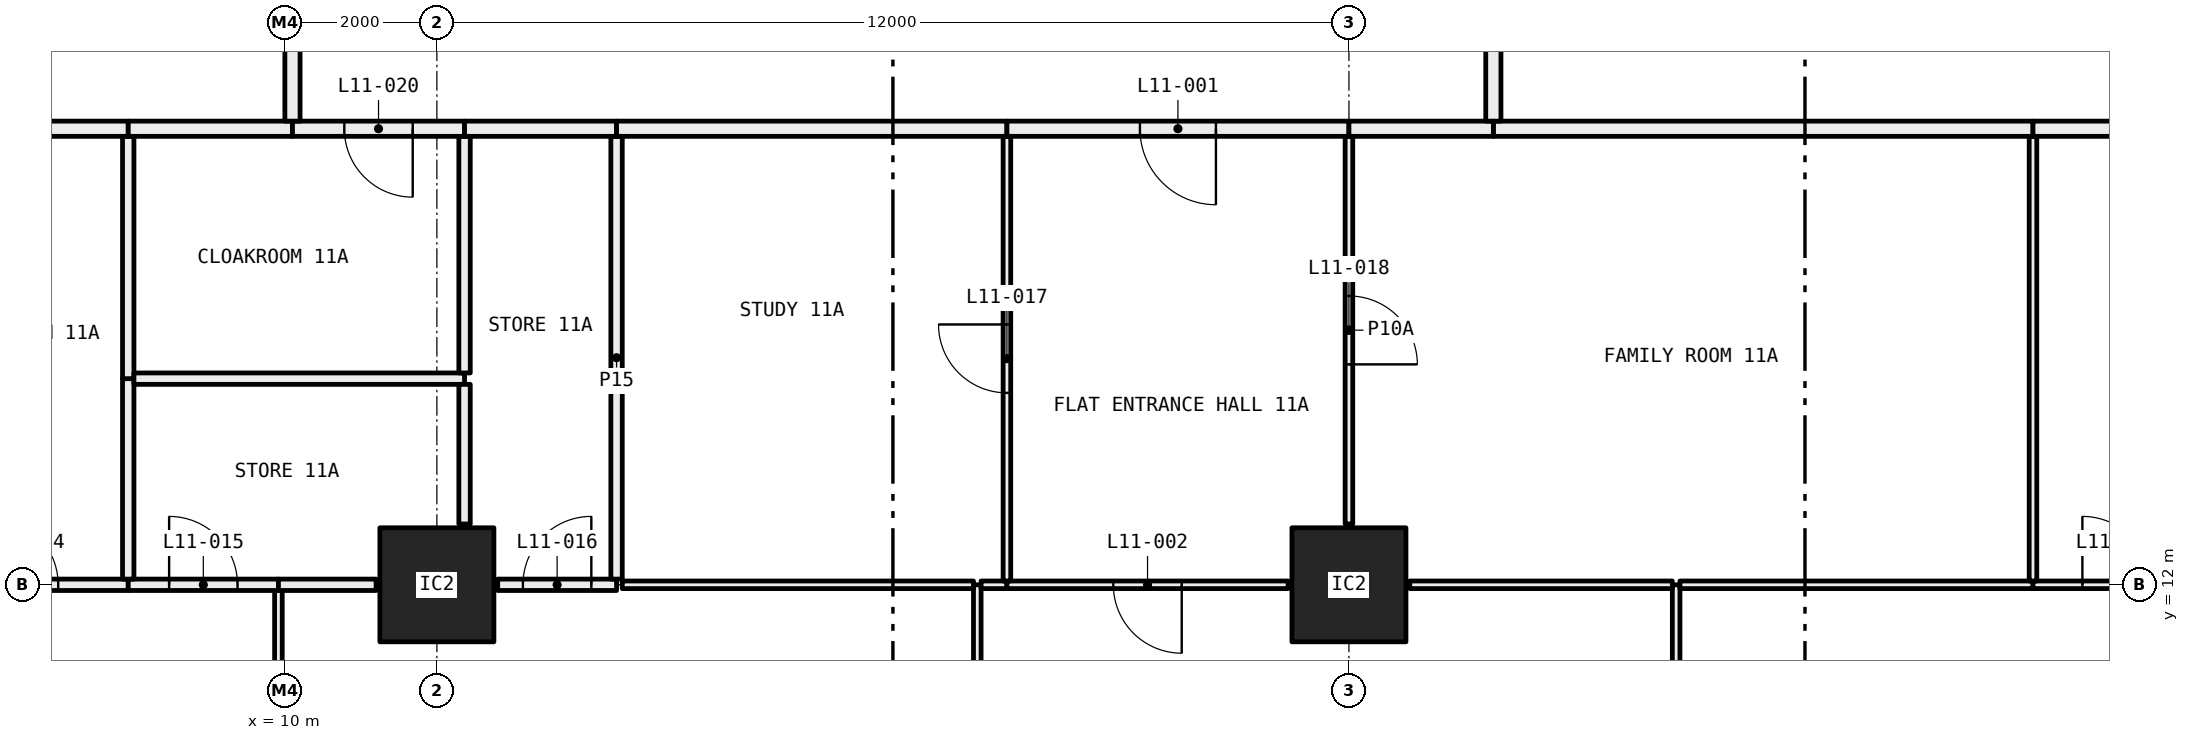
"""IFC4 building model, lengths in metres.
Left out: names, types, materials, properties, quantities, classifications, styles, units other than length and angle.
Written with IfcOpenShell. Run it as: python <this file> out.ifc"""

import sys

from ifc_helpers import new_model, si_unit, direction, frame, frame_2d, origin, origin_2d, place, context, subcontext, project, spatial, rectangle, hollow_rectangle, extrude, element, fill, save


model = new_model("IFC4")
c1 = context("Model", 3, precision=1e-05, world=origin(), true_north=direction((0.0, 1.0)))
c2 = subcontext(c1, "Body", "Model", "MODEL_VIEW")
j1 = project(units=[si_unit("LENGTHUNIT", "METRE"), si_unit("PLANEANGLEUNIT", "RADIAN")], contexts=[c1])
p1 = place(None, origin())
s1 = spatial("IfcSite", under=j1, at=p1, CompositionType="ELEMENT")
p2 = place(p1, origin())
s2 = spatial("IfcBuilding", under=s1, at=p2, CompositionType="ELEMENT")
p3 = place(p2, frame((0.0, 0.0, 50.7)))
s3 = spatial("IfcBuildingStorey", under=s2, at=p3, CompositionType="ELEMENT", Elevation=50.7)
for number, where, z_axis, x_axis in (
    (1, (12.0, 12.0, 0.0), (0.0, 0.0, 1.0), (1.0, 0.0, 0.0)),
    (2, (24.0, 12.0, 0.0), (0.0, 0.0, 1.0), (1.0, 0.0, 0.0)),
):
    element("IfcColumn", number, at=place(p3, frame(where, z_axis=z_axis, x_axis=x_axis)), inside=s3, PredefinedType="COLUMN", context=c2, shape_type="SweptSolid", body=[
        extrude(hollow_rectangle(XDim=1.5, YDim=1.5, WallThickness=0.065, at=origin_2d()), origin(), (0.0, 0.0, 1.0), 3.05),
    ])
p4 = place(p3, frame((9.915, 6.05, 0.0), z_axis=(0.0, 0.0, 1.0), x_axis=(0.0, 1.0, 0.0)))
e3 = element("IfcWall", 3, at=p4, inside=s3, PredefinedType="PARTITIONING", context=c2, shape_type="SweptSolid", body=[
    extrude(rectangle(XDim=5.875, YDim=0.1, at=frame_2d((2.938, 0.0))), origin(), (0.0, 0.0, 1.0), 2.45),
])
p5 = place(p4, frame((2.488, 0.0, 0.0)))
e4 = element("IfcOpeningElement", 4, at=p5, cuts=e3, PredefinedType="OPENING", context=c2, shape_type="SweptSolid", body=[
    extrude(rectangle(XDim=0.9, YDim=2.1, at=frame_2d((0.45, 1.05))), frame((0.0, 0.06, 0.0), z_axis=(0.0, -1.0, 0.0), x_axis=(1.0, 0.0, 0.0)), (0.0, 0.0, 1.0), 0.12),
])
p6 = place(p3, frame((7.939, 12.0, 0.0), z_axis=(0.0, 0.0, 1.0), x_axis=(-1.0, 0.0, 0.0)))
e5 = element("IfcWall", 5, at=p6, inside=s3, PredefinedType="PARTITIONING", context=c2, shape_type="SweptSolid", body=[
    extrude(rectangle(XDim=2.743, YDim=0.15, at=frame_2d((1.372, 0.0))), origin(), (0.0, 0.0, 1.0), 2.45),
])
p7 = place(p6, frame((0.921, 0.0, 0.0)))
e6 = element("IfcOpeningElement", 6, at=p7, cuts=e5, PredefinedType="OPENING", context=c2, shape_type="SweptSolid", body=[
    extrude(rectangle(XDim=0.9, YDim=2.1, at=frame_2d((0.45, 1.05))), frame((0.0, 0.085, 0.0), z_axis=(0.0, -1.0, 0.0), x_axis=(1.0, 0.0, 0.0)), (0.0, 0.0, 1.0), 0.17),
])
p8 = place(p3, frame((9.915, 12.0, 0.0), z_axis=(0.0, 0.0, 1.0), x_axis=(-1.0, 0.0, 0.0)))
e7 = element("IfcWall", 7, at=p8, inside=s3, PredefinedType="PARTITIONING", context=c2, shape_type="SweptSolid", body=[
    extrude(rectangle(XDim=1.976, YDim=0.15, at=frame_2d((0.988, 0.0))), origin(), (0.0, 0.0, 1.0), 2.45),
])
p9 = place(p8, frame((0.538, 0.0, 0.0)))
e8 = element("IfcOpeningElement", 8, at=p9, cuts=e7, PredefinedType="OPENING", context=c2, shape_type="SweptSolid", body=[
    extrude(rectangle(XDim=0.9, YDim=2.1, at=frame_2d((0.45, 1.05))), frame((0.0, 0.085, 0.0), z_axis=(0.0, -1.0, 0.0), x_axis=(1.0, 0.0, 0.0)), (0.0, 0.0, 1.0), 0.17),
])
p10 = place(p3, frame((19.11, 6.05, 0.0), z_axis=(0.0, 0.0, 1.0), x_axis=(0.0, 1.0, 0.0)))
e9 = element("IfcWall", 9, at=p10, inside=s3, PredefinedType="PARTITIONING", context=c2, shape_type="SweptSolid", body=[
    extrude(rectangle(XDim=5.95, YDim=0.1, at=frame_2d((2.975, 0.0))), origin(), (0.0, 0.0, 1.0), 2.45),
])
p11 = place(p10, frame((2.525, 0.0, 0.0)))
e10 = element("IfcOpeningElement", 10, at=p11, cuts=e9, PredefinedType="OPENING", context=c2, shape_type="SweptSolid", body=[
    extrude(rectangle(XDim=0.9, YDim=2.1, at=frame_2d((0.45, 1.05))), frame((0.0, 0.06, 0.0), z_axis=(0.0, -1.0, 0.0), x_axis=(1.0, 0.0, 0.0)), (0.0, 0.0, 1.0), 0.12),
])
p12 = place(p3, frame((11.2, 12.0, 0.0), z_axis=(0.0, 0.0, 1.0), x_axis=(-1.0, 0.0, 0.0)))
e11 = element("IfcWall", 11, at=p12, inside=s3, PredefinedType="PARTITIONING", context=c2, shape_type="SweptSolid", body=[
    extrude(rectangle(XDim=1.285, YDim=0.15, at=frame_2d((0.643, 0.0))), origin(), (0.0, 0.0, 1.0), 2.45),
])
p13 = place(p3, frame((14.364, 12.0, 0.0), z_axis=(0.0, 0.0, 1.0), x_axis=(-1.0, 0.0, 0.0)))
e12 = element("IfcWall", 12, at=p13, inside=s3, PredefinedType="PARTITIONING", context=c2, shape_type="SweptSolid", body=[
    extrude(rectangle(XDim=1.564, YDim=0.15, at=frame_2d((0.782, 0.0))), origin(), (0.0, 0.0, 1.0), 2.45),
])
p14 = place(p13, frame((0.332, 0.0, 0.0)))
e13 = element("IfcOpeningElement", 13, at=p14, cuts=e12, PredefinedType="OPENING", context=c2, shape_type="SweptSolid", body=[
    extrude(rectangle(XDim=0.9, YDim=2.1, at=frame_2d((0.45, 1.05))), frame((0.0, 0.085, 0.0), z_axis=(0.0, -1.0, 0.0), x_axis=(1.0, 0.0, 0.0)), (0.0, 0.0, 1.0), 0.17),
])
p15 = place(p3, frame((19.06, 12.0, 0.0), z_axis=(0.0, 0.0, 1.0), x_axis=(-1.0, 0.0, 0.0)))
e14 = element("IfcWall", 14, at=p15, inside=s3, PredefinedType="PARTITIONING", context=c2, shape_type="SweptSolid", body=[
    extrude(rectangle(XDim=4.621, YDim=0.1, at=frame_2d((2.311, 0.0))), origin(), (0.0, 0.0, 1.0), 2.45),
])
p16 = place(p3, frame((28.305, 6.05, 0.0), z_axis=(0.0, 0.0, 1.0), x_axis=(0.0, 1.0, 0.0)))
e15 = element("IfcWall", 15, at=p16, inside=s3, PredefinedType="PARTITIONING", context=c2, shape_type="SweptSolid", body=[
    extrude(rectangle(XDim=5.95, YDim=0.1, at=frame_2d((2.975, 0.0))), origin(), (0.0, 0.0, 1.0), 2.45),
])
p17 = place(p16, frame((2.525, 0.0, 0.0)))
e16 = element("IfcOpeningElement", 16, at=p17, cuts=e15, PredefinedType="OPENING", context=c2, shape_type="SweptSolid", body=[
    extrude(rectangle(XDim=0.9, YDim=2.1, at=frame_2d((0.45, 1.05))), frame((0.0, 0.06, 0.0), z_axis=(0.0, -1.0, 0.0), x_axis=(1.0, 0.0, 0.0)), (0.0, 0.0, 1.0), 0.12),
])
p18 = place(p3, frame((19.5, 12.0, 0.0), z_axis=(0.0, 0.0, 1.0), x_axis=(-1.0, 0.0, 0.0)))
e17 = element("IfcWall", 17, at=p18, inside=s3, PredefinedType="PARTITIONING", context=c2, shape_type="SweptSolid", body=[
    extrude(rectangle(XDim=0.34, YDim=0.1, at=frame_2d((0.17, 0.0))), origin(), (0.0, 0.0, 1.0), 2.45),
])
p19 = place(p3, frame((23.2, 12.0, 0.0), z_axis=(0.0, 0.0, 1.0), x_axis=(-1.0, 0.0, 0.0)))
e18 = element("IfcWall", 18, at=p19, inside=s3, PredefinedType="PARTITIONING", context=c2, shape_type="SweptSolid", body=[
    extrude(rectangle(XDim=3.7, YDim=0.1, at=frame_2d((1.85, 0.0))), origin(), (0.0, 0.0, 1.0), 2.45),
])
p20 = place(p19, frame((1.4, 0.0, 0.0)))
e19 = element("IfcOpeningElement", 19, at=p20, cuts=e18, PredefinedType="OPENING", context=c2, shape_type="SweptSolid", body=[
    extrude(rectangle(XDim=0.9, YDim=2.1, at=frame_2d((0.45, 1.05))), frame((0.0, 0.06, 0.0), z_axis=(0.0, -1.0, 0.0), x_axis=(1.0, 0.0, 0.0)), (0.0, 0.0, 1.0), 0.12),
])
p21 = place(p3, frame((28.255, 12.0, 0.0), z_axis=(0.0, 0.0, 1.0), x_axis=(-1.0, 0.0, 0.0)))
e20 = element("IfcWall", 20, at=p21, inside=s3, PredefinedType="PARTITIONING", context=c2, shape_type="SweptSolid", body=[
    extrude(rectangle(XDim=3.455, YDim=0.1, at=frame_2d((1.728, 0.0))), origin(), (0.0, 0.0, 1.0), 2.45),
])
p22 = place(p3, frame((33.0, 12.0, 0.0), z_axis=(0.0, 0.0, 1.0), x_axis=(-1.0, 0.0, 0.0)))
e21 = element("IfcWall", 21, at=p22, inside=s3, PredefinedType="PARTITIONING", context=c2, shape_type="SweptSolid", body=[
    extrude(rectangle(XDim=4.645, YDim=0.1, at=frame_2d((2.323, 0.0))), origin(), (0.0, 0.0, 1.0), 2.45),
])
p23 = place(p3, frame((35.2, 12.0, 0.0), z_axis=(0.0, 0.0, 1.0), x_axis=(-1.0, 0.0, 0.0)))
e22 = element("IfcWall", 22, at=p23, inside=s3, PredefinedType="PARTITIONING", context=c2, shape_type="SweptSolid", body=[
    extrude(rectangle(XDim=2.2, YDim=0.1, at=frame_2d((1.1, 0.0))), origin(), (0.0, 0.0, 1.0), 2.45),
])
p24 = place(p23, frame((0.65, 0.0, 0.0)))
e23 = element("IfcOpeningElement", 23, at=p24, cuts=e22, PredefinedType="OPENING", context=c2, shape_type="SweptSolid", body=[
    extrude(rectangle(XDim=0.9, YDim=2.1, at=frame_2d((0.45, 1.05))), frame((0.0, 0.06, 0.0), z_axis=(0.0, -1.0, 0.0), x_axis=(1.0, 0.0, 0.0)), (0.0, 0.0, 1.0), 0.12),
])
p25 = place(p3, frame((7.939, 12.075, 0.0), z_axis=(0.0, 0.0, 1.0), x_axis=(0.0, 1.0, 0.0)))
e24 = element("IfcWall", 24, at=p25, inside=s3, PredefinedType="PARTITIONING", context=c2, shape_type="SweptSolid", body=[
    extrude(rectangle(XDim=2.637, YDim=0.15, at=frame_2d((1.318, 0.0))), origin(), (0.0, 0.0, 1.0), 2.45),
])
p26 = place(p3, frame((7.939, 14.712, 0.0), z_axis=(0.0, 0.0, 1.0), x_axis=(0.0, 1.0, 0.0)))
e25 = element("IfcWall", 25, at=p26, inside=s3, PredefinedType="PARTITIONING", context=c2, shape_type="SweptSolid", body=[
    extrude(rectangle(XDim=3.188, YDim=0.15, at=frame_2d((1.594, 0.0))), origin(), (0.0, 0.0, 1.0), 3.05),
])
p27 = place(p3, frame((7.939, 18.0, 0.0), z_axis=(0.0, 0.0, 1.0), x_axis=(-1.0, 0.0, 0.0)))
e26 = element("IfcWall", 26, at=p27, inside=s3, PredefinedType="PARTITIONING", context=c2, shape_type="SweptSolid", body=[
    extrude(rectangle(XDim=1.939, YDim=0.2, at=frame_2d((0.969, 0.0))), origin(), (0.0, 0.0, 1.0), 3.05),
])
p28 = place(p3, frame((12.364, 14.712, 0.0), z_axis=(0.0, 0.0, 1.0), x_axis=(-1.0, 0.0, 0.0)))
e27 = element("IfcWall", 27, at=p28, inside=s3, PredefinedType="PARTITIONING", context=c2, shape_type="SweptSolid", body=[
    extrude(rectangle(XDim=4.35, YDim=0.15, at=frame_2d((2.175, 0.0))), origin(), (0.0, 0.0, 1.0), 3.05),
])
p29 = place(p3, frame((12.364, 12.8, 0.0), z_axis=(0.0, 0.0, 1.0), x_axis=(0.0, 1.0, 0.0)))
e28 = element("IfcWall", 28, at=p29, inside=s3, PredefinedType="PARTITIONING", context=c2, shape_type="SweptSolid", body=[
    extrude(rectangle(XDim=1.837, YDim=0.15, at=frame_2d((0.918, 0.0))), origin(), (0.0, 0.0, 1.0), 3.05),
])
p30 = place(p3, frame((12.364, 14.787, 0.0), z_axis=(0.0, 0.0, 1.0), x_axis=(0.0, 1.0, 0.0)))
e29 = element("IfcWall", 29, at=p30, inside=s3, PredefinedType="PARTITIONING", context=c2, shape_type="SweptSolid", body=[
    extrude(rectangle(XDim=3.113, YDim=0.15, at=frame_2d((1.556, 0.0))), origin(), (0.0, 0.0, 1.0), 3.05),
])
p31 = place(p3, frame((10.1, 18.0, 0.0), z_axis=(0.0, 0.0, 1.0), x_axis=(-1.0, 0.0, 0.0)))
e30 = element("IfcWall", 30, at=p31, inside=s3, PredefinedType="PARTITIONING", context=c2, shape_type="SweptSolid", body=[
    extrude(rectangle(XDim=2.161, YDim=0.2, at=frame_2d((1.081, 0.0))), origin(), (0.0, 0.0, 1.0), 3.05),
])
p32 = place(p3, frame((12.364, 18.0, 0.0), z_axis=(0.0, 0.0, 1.0), x_axis=(-1.0, 0.0, 0.0)))
e31 = element("IfcWall", 31, at=p32, inside=s3, PredefinedType="PARTITIONING", context=c2, shape_type="SweptSolid", body=[
    extrude(rectangle(XDim=2.264, YDim=0.2, at=frame_2d((1.132, 0.0))), origin(), (0.0, 0.0, 1.0), 3.05),
])
p33 = place(p32, frame((0.682, 0.0, 0.0)))
e32 = element("IfcOpeningElement", 32, at=p33, cuts=e31, PredefinedType="OPENING", context=c2, shape_type="SweptSolid", body=[
    extrude(rectangle(XDim=0.9, YDim=2.1, at=frame_2d((0.45, 1.05))), frame((0.0, 0.11, 0.0), z_axis=(0.0, -1.0, 0.0), x_axis=(1.0, 0.0, 0.0)), (0.0, 0.0, 1.0), 0.22),
])
p34 = place(p3, frame((14.364, 12.075, 0.0), z_axis=(0.0, 0.0, 1.0), x_axis=(0.0, 1.0, 0.0)))
e33 = element("IfcWall", 33, at=p34, inside=s3, PredefinedType="PARTITIONING", context=c2, shape_type="SweptSolid", body=[
    extrude(rectangle(XDim=5.825, YDim=0.15, at=frame_2d((2.913, 0.0))), origin(), (0.0, 0.0, 1.0), 2.45),
])
p35 = place(p3, frame((14.364, 18.0, 0.0), z_axis=(0.0, 0.0, 1.0), x_axis=(-1.0, 0.0, 0.0)))
e34 = element("IfcWall", 34, at=p35, inside=s3, PredefinedType="PARTITIONING", context=c2, shape_type="SweptSolid", body=[
    extrude(rectangle(XDim=2.0, YDim=0.2, at=frame_2d((1.0, 0.0))), origin(), (0.0, 0.0, 1.0), 3.05),
])
p36 = place(p3, frame((19.5, 12.05, 0.0), z_axis=(0.0, 0.0, 1.0), x_axis=(0.0, 1.0, 0.0)))
e35 = element("IfcWall", 35, at=p36, inside=s3, PredefinedType="PARTITIONING", context=c2, shape_type="SweptSolid", body=[
    extrude(rectangle(XDim=5.85, YDim=0.1, at=frame_2d((2.925, 0.0))), origin(), (0.0, 0.0, 1.0), 2.45),
])
p37 = place(p36, frame((2.475, 0.0, 0.0)))
e36 = element("IfcOpeningElement", 36, at=p37, cuts=e35, PredefinedType="OPENING", context=c2, shape_type="SweptSolid", body=[
    extrude(rectangle(XDim=0.9, YDim=2.1, at=frame_2d((0.45, 1.05))), frame((0.0, 0.06, 0.0), z_axis=(0.0, -1.0, 0.0), x_axis=(1.0, 0.0, 0.0)), (0.0, 0.0, 1.0), 0.12),
])
p38 = place(p3, frame((19.5, 18.0, 0.0), z_axis=(0.0, 0.0, 1.0), x_axis=(-1.0, 0.0, 0.0)))
e37 = element("IfcWall", 37, at=p38, inside=s3, PredefinedType="PARTITIONING", context=c2, shape_type="SweptSolid", body=[
    extrude(rectangle(XDim=5.136, YDim=0.2, at=frame_2d((2.568, 0.0))), origin(), (0.0, 0.0, 1.0), 3.05),
])
p39 = place(p3, frame((24.0, 12.8, 0.0), z_axis=(0.0, 0.0, 1.0), x_axis=(0.0, 1.0, 0.0)))
e38 = element("IfcWall", 38, at=p39, inside=s3, PredefinedType="PARTITIONING", context=c2, shape_type="SweptSolid", body=[
    extrude(rectangle(XDim=5.1, YDim=0.1, at=frame_2d((2.55, 0.0))), origin(), (0.0, 0.0, 1.0), 3.05),
])
p40 = place(p39, frame((2.1, 0.0, 0.0)))
e39 = element("IfcOpeningElement", 39, at=p40, cuts=e38, PredefinedType="OPENING", context=c2, shape_type="SweptSolid", body=[
    extrude(rectangle(XDim=0.9, YDim=2.1, at=frame_2d((0.45, 1.05))), frame((0.0, 0.06, 0.0), z_axis=(0.0, -1.0, 0.0), x_axis=(1.0, 0.0, 0.0)), (0.0, 0.0, 1.0), 0.12),
])
p41 = place(p3, frame((24.0, 18.0, 0.0), z_axis=(0.0, 0.0, 1.0), x_axis=(-1.0, 0.0, 0.0)))
e40 = element("IfcWall", 40, at=p41, inside=s3, PredefinedType="PARTITIONING", context=c2, shape_type="SweptSolid", body=[
    extrude(rectangle(XDim=4.5, YDim=0.2, at=frame_2d((2.25, 0.0))), origin(), (0.0, 0.0, 1.0), 3.05),
])
p42 = place(p41, frame((1.75, 0.0, 0.0)))
e41 = element("IfcOpeningElement", 41, at=p42, cuts=e40, PredefinedType="OPENING", context=c2, shape_type="SweptSolid", body=[
    extrude(rectangle(XDim=1.0, YDim=2.1, at=frame_2d((0.5, 1.05))), frame((0.0, 0.11, 0.0), z_axis=(0.0, -1.0, 0.0), x_axis=(1.0, 0.0, 0.0)), (0.0, 0.0, 1.0), 0.22),
])
p43 = place(p3, frame((33.0, 12.05, 0.0), z_axis=(0.0, 0.0, 1.0), x_axis=(0.0, 1.0, 0.0)))
e42 = element("IfcWall", 42, at=p43, inside=s3, PredefinedType="PARTITIONING", context=c2, shape_type="SweptSolid", body=[
    extrude(rectangle(XDim=5.85, YDim=0.1, at=frame_2d((2.925, 0.0))), origin(), (0.0, 0.0, 1.0), 2.45),
])
p44 = place(p3, frame((33.0, 18.0, 0.0), z_axis=(0.0, 0.0, 1.0), x_axis=(-1.0, 0.0, 0.0)))
e43 = element("IfcWall", 43, at=p44, inside=s3, PredefinedType="PARTITIONING", context=c2, shape_type="SweptSolid", body=[
    extrude(rectangle(XDim=7.1, YDim=0.2, at=frame_2d((3.55, 0.0))), origin(), (0.0, 0.0, 1.0), 3.05),
])
p45 = place(p3, frame((25.9, 18.0, 0.0), z_axis=(0.0, 0.0, 1.0), x_axis=(-1.0, 0.0, 0.0)))
e44 = element("IfcWall", 44, at=p45, inside=s3, PredefinedType="PARTITIONING", context=c2, shape_type="SweptSolid", body=[
    extrude(rectangle(XDim=1.9, YDim=0.2, at=frame_2d((0.95, 0.0))), origin(), (0.0, 0.0, 1.0), 3.05),
])
p46 = place(p3, frame((36.0, 18.0, 0.0), z_axis=(0.0, 0.0, 1.0), x_axis=(-1.0, 0.0, 0.0)))
e45 = element("IfcWall", 45, at=p46, inside=s3, PredefinedType="PARTITIONING", context=c2, shape_type="SweptSolid", body=[
    extrude(rectangle(XDim=3.0, YDim=0.2, at=frame_2d((1.5, 0.0))), origin(), (0.0, 0.0, 1.0), 2.45),
])
p47 = place(p3, frame((25.9, 23.9, 0.0), z_axis=(0.0, 0.0, 1.0), x_axis=(0.0, -1.0, 0.0)))
e46 = element("IfcWall", 46, at=p47, inside=s3, PredefinedType="PARTITIONING", context=c2, shape_type="SweptSolid", body=[
    extrude(rectangle(XDim=5.8, YDim=0.2, at=frame_2d((2.9, 0.0))), origin(), (0.0, 0.0, 1.0), 3.05),
])
p48 = place(p3, frame((10.1, 18.1, 0.0), z_axis=(0.0, 0.0, 1.0), x_axis=(0.0, 1.0, 0.0)))
e47 = element("IfcWall", 47, at=p48, inside=s3, PredefinedType="PARTITIONING", context=c2, shape_type="SweptSolid", body=[
    extrude(rectangle(XDim=4.4, YDim=0.2, at=frame_2d((2.2, 0.0))), origin(), (0.0, 0.0, 1.0), 3.05),
])
p49 = place(p42, origin())
e48 = element("IfcDoor", 48, at=p49, inside=s3, OperationType="SINGLE_SWING_RIGHT", PredefinedType="DOOR", context=c2, shape_type="SweptSolid", body=[
    extrude(rectangle(XDim=1.0, YDim=2.1, at=frame_2d((0.5, 1.05))), frame((0.0, 0.025, 0.0), z_axis=(0.0, -1.0, 0.0), x_axis=(1.0, 0.0, 0.0)), (0.0, 0.0, 1.0), 0.05),
])
fill(e41, e48)
p50 = place(p20, origin())
e49 = element("IfcDoor", 49, at=p50, inside=s3, OperationType="SINGLE_SWING_RIGHT", PredefinedType="DOOR", context=c2, shape_type="SweptSolid", body=[
    extrude(rectangle(XDim=0.9, YDim=2.1, at=frame_2d((0.45, 1.05))), frame((0.0, 0.025, 0.0), z_axis=(0.0, -1.0, 0.0), x_axis=(1.0, 0.0, 0.0)), (0.0, 0.0, 1.0), 0.05),
])
fill(e19, e49)
p51 = place(p7, frame((0.9, 0.0, 0.0), x_axis=(-1.0, 0.0, 0.0)))
e50 = element("IfcDoor", 50, at=p51, inside=s3, OperationType="SINGLE_SWING_RIGHT", PredefinedType="DOOR", context=c2, shape_type="SweptSolid", body=[
    extrude(rectangle(XDim=0.9, YDim=2.1, at=frame_2d((0.45, 1.05))), frame((0.0, 0.025, 0.0), z_axis=(0.0, -1.0, 0.0), x_axis=(1.0, 0.0, 0.0)), (0.0, 0.0, 1.0), 0.05),
])
fill(e6, e50)
p52 = place(p9, frame((0.9, 0.0, 0.0), x_axis=(-1.0, 0.0, 0.0)))
e51 = element("IfcDoor", 51, at=p52, inside=s3, OperationType="SINGLE_SWING_RIGHT", PredefinedType="DOOR", context=c2, shape_type="SweptSolid", body=[
    extrude(rectangle(XDim=0.9, YDim=2.1, at=frame_2d((0.45, 1.05))), frame((0.0, 0.025, 0.0), z_axis=(0.0, -1.0, 0.0), x_axis=(1.0, 0.0, 0.0)), (0.0, 0.0, 1.0), 0.05),
])
fill(e8, e51)
p53 = place(p14, frame((0.9, 0.0, 0.0), x_axis=(-1.0, 0.0, 0.0)))
e52 = element("IfcDoor", 52, at=p53, inside=s3, OperationType="SINGLE_SWING_LEFT", PredefinedType="DOOR", context=c2, shape_type="SweptSolid", body=[
    extrude(rectangle(XDim=0.9, YDim=2.1, at=frame_2d((0.45, 1.05))), frame((0.0, 0.025, 0.0), z_axis=(0.0, -1.0, 0.0), x_axis=(1.0, 0.0, 0.0)), (0.0, 0.0, 1.0), 0.05),
])
fill(e13, e52)
p54 = place(p37, origin())
e53 = element("IfcDoor", 53, at=p54, inside=s3, OperationType="SINGLE_SWING_LEFT", PredefinedType="DOOR", context=c2, shape_type="SweptSolid", body=[
    extrude(rectangle(XDim=0.9, YDim=2.1, at=frame_2d((0.45, 1.05))), frame((0.0, 0.025, 0.0), z_axis=(0.0, -1.0, 0.0), x_axis=(1.0, 0.0, 0.0)), (0.0, 0.0, 1.0), 0.05),
])
fill(e36, e53)
p55 = place(p40, frame((0.9, 0.0, 0.0), x_axis=(-1.0, 0.0, 0.0)))
e54 = element("IfcDoor", 54, at=p55, inside=s3, OperationType="SINGLE_SWING_LEFT", PredefinedType="DOOR", context=c2, shape_type="SweptSolid", body=[
    extrude(rectangle(XDim=0.9, YDim=2.1, at=frame_2d((0.45, 1.05))), frame((0.0, 0.025, 0.0), z_axis=(0.0, -1.0, 0.0), x_axis=(1.0, 0.0, 0.0)), (0.0, 0.0, 1.0), 0.05),
])
fill(e39, e54)
p56 = place(p24, frame((0.9, 0.0, 0.0), x_axis=(-1.0, 0.0, 0.0)))
e55 = element("IfcDoor", 55, at=p56, inside=s3, OperationType="SINGLE_SWING_RIGHT", PredefinedType="DOOR", context=c2, shape_type="SweptSolid", body=[
    extrude(rectangle(XDim=0.9, YDim=2.1, at=frame_2d((0.45, 1.05))), frame((0.0, 0.025, 0.0), z_axis=(0.0, -1.0, 0.0), x_axis=(1.0, 0.0, 0.0)), (0.0, 0.0, 1.0), 0.05),
])
fill(e23, e55)
p57 = place(p33, origin())
e56 = element("IfcDoor", 56, at=p57, inside=s3, OperationType="SINGLE_SWING_RIGHT", PredefinedType="DOOR", context=c2, shape_type="SweptSolid", body=[
    extrude(rectangle(XDim=0.9, YDim=2.1, at=frame_2d((0.45, 1.05))), frame((0.0, 0.025, 0.0), z_axis=(0.0, -1.0, 0.0), x_axis=(1.0, 0.0, 0.0)), (0.0, 0.0, 1.0), 0.05),
])
fill(e32, e56)
save(model, sys.argv[1])
